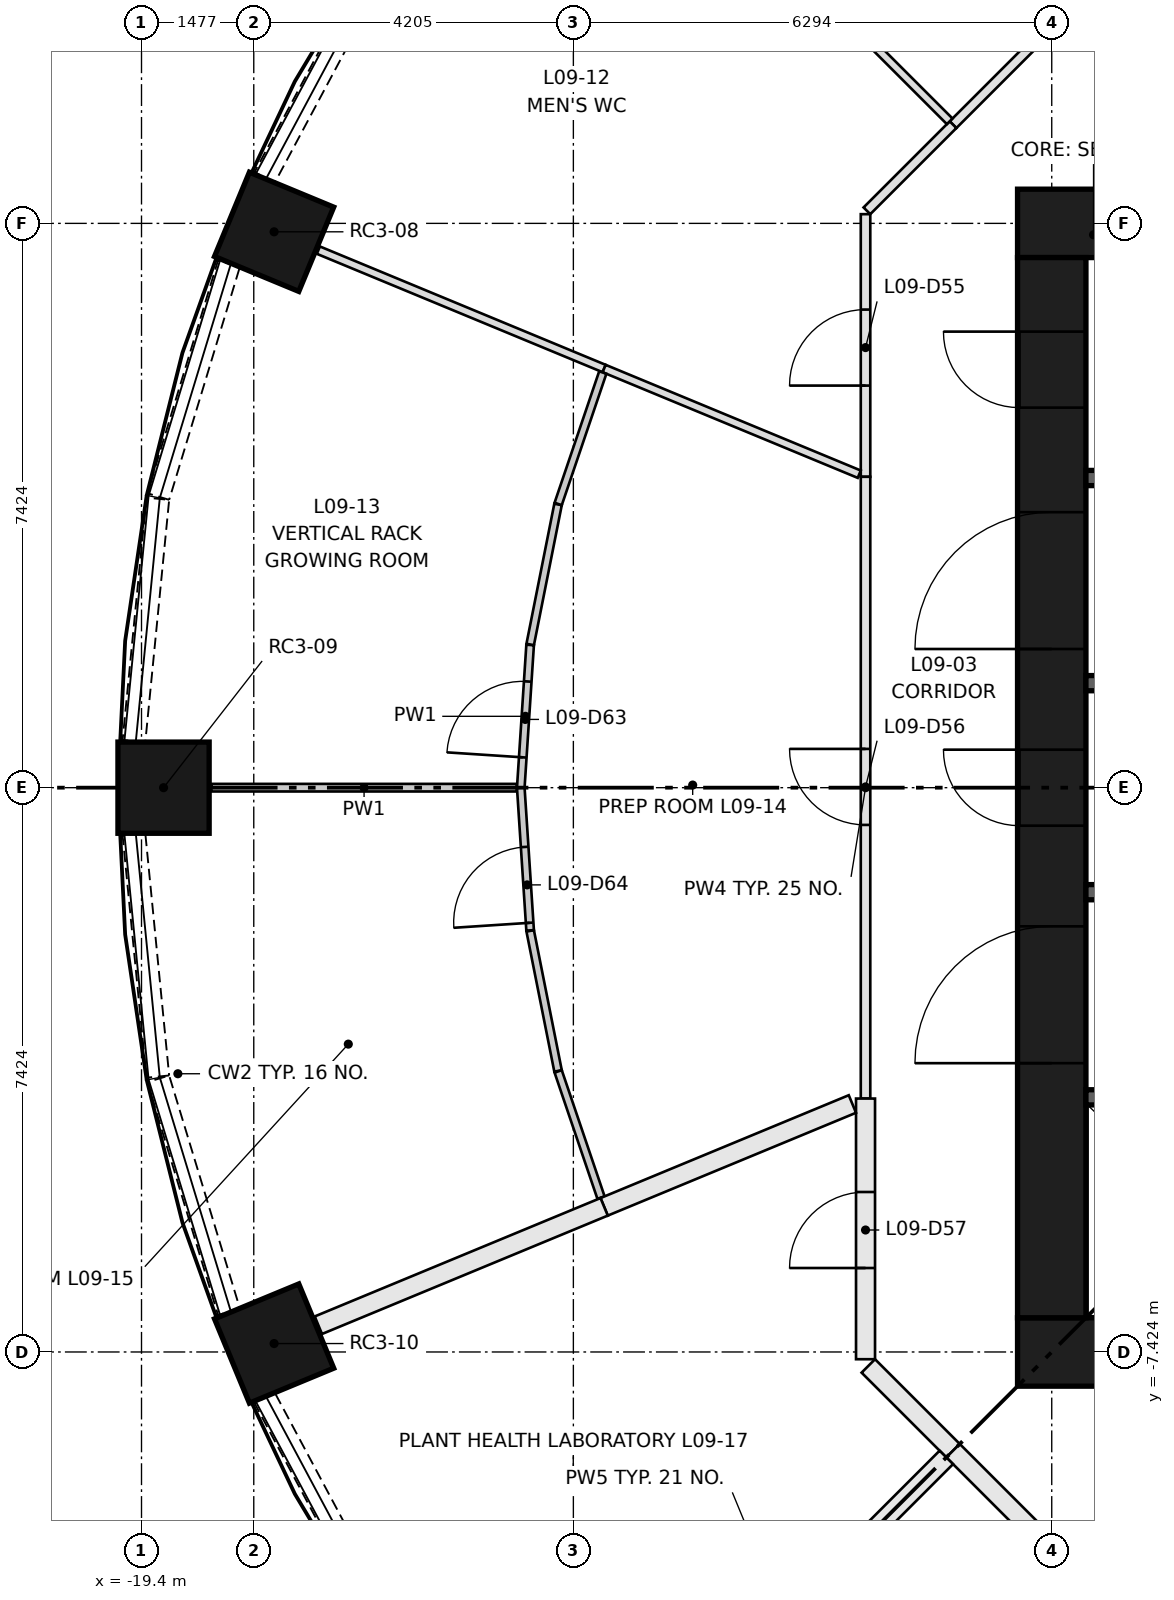
"""IFC4 building model, lengths in metres.
Left out: names, types, materials, properties, quantities, classifications, styles, units other than length and angle.
Written with IfcOpenShell. Run it as: python <this file> out.ifc"""

import sys

from ifc_helpers import new_model, si_unit, direction, frame, frame_2d, origin, origin_2d, place, context, subcontext, project, spatial, rectangle, extrude, element, fill, save


model = new_model("IFC4")
c1 = context("Model", 3, precision=1e-05, world=origin(), true_north=direction((0.0, 1.0)))
c2 = subcontext(c1, "Body", "Model", "MODEL_VIEW")
j1 = project(units=[si_unit("LENGTHUNIT", "METRE"), si_unit("PLANEANGLEUNIT", "RADIAN")], contexts=[c1])
p1 = place(None, origin())
s1 = spatial("IfcSite", under=j1, at=p1, CompositionType="ELEMENT")
p2 = place(p1, origin())
s2 = spatial("IfcBuilding", under=s1, at=p2, CompositionType="ELEMENT")
p3 = place(p2, frame((0.0, 0.0, 37.15)))
s3 = spatial("IfcBuildingStorey", under=s2, at=p3, CompositionType="ELEMENT", Elevation=37.15)
for number, where, z_axis, x_axis in (
    (1, (-17.655, 7.313, 0.0), (0.0, 0.0, 1.0), (-0.924, 0.383, 0.0)),
    (2, (-19.11, 0.0, 0.0), (0.0, 0.0, 1.0), (-1.0, 0.0, 0.0)),
    (3, (-17.655, -7.313, 0.0), (0.0, 0.0, 1.0), (-0.924, -0.383, 0.0)),
):
    element("IfcColumn", number, at=place(p3, frame(where, z_axis=z_axis, x_axis=x_axis)), inside=s3, PredefinedType="COLUMN", context=c2, shape_type="SweptSolid", body=[
        extrude(rectangle(XDim=1.2, YDim=1.2, at=origin_2d()), origin(), (0.0, 0.0, 1.0), 3.65),
    ])
for number, where, z_axis, x_axis in (
    (4, (-7.874, -7.424, 0.0), (0.0, 0.0, 1.0), (1.0, 0.0, 0.0)),
    (5, (-7.874, 7.424, 0.0), (0.0, 0.0, 1.0), (1.0, 0.0, 0.0)),
):
    element("IfcWall", number, at=place(p3, frame(where, z_axis=z_axis, x_axis=x_axis)), inside=s3, PredefinedType="SHEAR", context=c2, shape_type="SweptSolid", body=[
        extrude(rectangle(XDim=15.748, YDim=0.9, at=frame_2d((7.874, 0.0))), origin(), (0.0, 0.0, 1.0), 3.65),
    ])
p4 = place(p3, frame((-7.424, -6.974, 0.0), z_axis=(0.0, 0.0, 1.0), x_axis=(0.0, 1.0, 0.0)))
e6 = element("IfcWall", 6, at=p4, inside=s3, PredefinedType="SHEAR", context=c2, shape_type="SweptSolid", body=[
    extrude(rectangle(XDim=13.948, YDim=0.9, at=frame_2d((6.974, 0.0))), origin(), (0.0, 0.0, 1.0), 3.65),
])
p5 = place(p4, frame((6.474, 0.0, 0.0)))
e7 = element("IfcOpeningElement", 7, at=p5, cuts=e6, PredefinedType="OPENING", context=c2, shape_type="SweptSolid", body=[
    extrude(rectangle(XDim=1.0, YDim=2.1, at=frame_2d((0.5, 1.05))), frame((0.0, 0.46, 0.0), z_axis=(0.0, -1.0, 0.0), x_axis=(1.0, 0.0, 0.0)), (0.0, 0.0, 1.0), 0.92),
])
p6 = place(p4, frame((3.35, 0.0, 0.0)))
e8 = element("IfcOpeningElement", 8, at=p6, cuts=e6, PredefinedType="OPENING", context=c2, shape_type="SweptSolid", body=[
    extrude(rectangle(XDim=1.8, YDim=2.1, at=frame_2d((0.9, 1.05))), frame((0.0, 0.46, 0.0), z_axis=(0.0, -1.0, 0.0), x_axis=(1.0, 0.0, 0.0)), (0.0, 0.0, 1.0), 0.92),
])
p7 = place(p4, frame((8.799, 0.0, 0.0)))
e9 = element("IfcOpeningElement", 9, at=p7, cuts=e6, PredefinedType="OPENING", context=c2, shape_type="SweptSolid", body=[
    extrude(rectangle(XDim=1.8, YDim=2.1, at=frame_2d((0.9, 1.05))), frame((0.0, 0.46, 0.0), z_axis=(0.0, -1.0, 0.0), x_axis=(1.0, 0.0, 0.0)), (0.0, 0.0, 1.0), 0.92),
])
p8 = place(p4, frame((11.974, 0.0, 0.0)))
e10 = element("IfcOpeningElement", 10, at=p8, cuts=e6, PredefinedType="OPENING", context=c2, shape_type="SweptSolid", body=[
    extrude(rectangle(XDim=1.0, YDim=2.1, at=frame_2d((0.5, 1.05))), frame((0.0, 0.46, 0.0), z_axis=(0.0, -1.0, 0.0), x_axis=(1.0, 0.0, 0.0)), (0.0, 0.0, 1.0), 0.92),
])
p9 = place(p3, frame((-6.974, -4.074, 0.0), z_axis=(0.0, 0.0, 1.0), x_axis=(1.0, 0.0, 0.0)))
e11 = element("IfcWall", 11, at=p9, inside=s3, PredefinedType="SHEAR", context=c2, shape_type="SweptSolid", body=[
    extrude(rectangle(XDim=13.948, YDim=0.2, at=frame_2d((6.974, 0.0))), origin(), (0.0, 0.0, 1.0), 3.3),
])
p10 = place(p9, frame((0.918, 0.0, 0.0)))
e12 = element("IfcOpeningElement", 12, at=p10, cuts=e11, PredefinedType="OPENING", context=c2, shape_type="SweptSolid", body=[
    extrude(rectangle(XDim=1.1, YDim=2.1, at=frame_2d((0.55, 1.05))), frame((0.0, 0.11, 0.0), z_axis=(0.0, -1.0, 0.0), x_axis=(1.0, 0.0, 0.0)), (0.0, 0.0, 1.0), 0.22),
])
p11 = place(p9, frame((4.055, 0.0, 0.0)))
e13 = element("IfcOpeningElement", 13, at=p11, cuts=e11, PredefinedType="OPENING", context=c2, shape_type="SweptSolid", body=[
    extrude(rectangle(XDim=1.1, YDim=2.1, at=frame_2d((0.55, 1.05))), frame((0.0, 0.11, 0.0), z_axis=(0.0, -1.0, 0.0), x_axis=(1.0, 0.0, 0.0)), (0.0, 0.0, 1.0), 0.22),
])
p12 = place(p9, frame((6.658, 0.0, 0.0)))
e14 = element("IfcOpeningElement", 14, at=p12, cuts=e11, PredefinedType="OPENING", context=c2, shape_type="SweptSolid", body=[
    extrude(rectangle(XDim=1.0, YDim=2.1, at=frame_2d((0.5, 1.05))), frame((0.0, 0.11, 0.0), z_axis=(0.0, -1.0, 0.0), x_axis=(1.0, 0.0, 0.0)), (0.0, 0.0, 1.0), 0.22),
])
p13 = place(p9, frame((8.627, 0.0, 0.0)))
e15 = element("IfcOpeningElement", 15, at=p13, cuts=e11, PredefinedType="OPENING", context=c2, shape_type="SweptSolid", body=[
    extrude(rectangle(XDim=1.0, YDim=2.1, at=frame_2d((0.5, 1.05))), frame((0.0, 0.11, 0.0), z_axis=(0.0, -1.0, 0.0), x_axis=(1.0, 0.0, 0.0)), (0.0, 0.0, 1.0), 0.22),
])
p14 = place(p9, frame((10.595, 0.0, 0.0)))
e16 = element("IfcOpeningElement", 16, at=p14, cuts=e11, PredefinedType="OPENING", context=c2, shape_type="SweptSolid", body=[
    extrude(rectangle(XDim=1.0, YDim=2.1, at=frame_2d((0.5, 1.05))), frame((0.0, 0.11, 0.0), z_axis=(0.0, -1.0, 0.0), x_axis=(1.0, 0.0, 0.0)), (0.0, 0.0, 1.0), 0.22),
])
p15 = place(p9, frame((12.564, 0.0, 0.0)))
e17 = element("IfcOpeningElement", 17, at=p15, cuts=e11, PredefinedType="OPENING", context=c2, shape_type="SweptSolid", body=[
    extrude(rectangle(XDim=1.0, YDim=2.1, at=frame_2d((0.5, 1.05))), frame((0.0, 0.11, 0.0), z_axis=(0.0, -1.0, 0.0), x_axis=(1.0, 0.0, 0.0)), (0.0, 0.0, 1.0), 0.22),
])
p16 = place(p3, frame((-6.974, 4.074, 0.0), z_axis=(0.0, 0.0, 1.0), x_axis=(1.0, 0.0, 0.0)))
e18 = element("IfcWall", 18, at=p16, inside=s3, PredefinedType="SHEAR", context=c2, shape_type="SweptSolid", body=[
    extrude(rectangle(XDim=6.974, YDim=0.2, at=frame_2d((3.487, 0.0))), origin(), (0.0, 0.0, 1.0), 3.3),
])
for number, where, z_axis, x_axis in (
    (19, (-6.974, -1.375, 0.0), (0.0, 0.0, 1.0), (1.0, 0.0, 0.0)),
    (20, (-6.974, 1.375, 0.0), (0.0, 0.0, 1.0), (1.0, 0.0, 0.0)),
):
    element("IfcWall", number, at=place(p3, frame(where, z_axis=z_axis, x_axis=x_axis)), inside=s3, PredefinedType="SHEAR", context=c2, shape_type="SweptSolid", body=[
        extrude(rectangle(XDim=2.6, YDim=0.2, at=frame_2d((1.3, 0.0))), origin(), (0.0, 0.0, 1.0), 3.3),
    ])
p17 = place(p3, frame((-16.27, 10.854, 0.0), z_axis=(0.0, 0.0, 1.0), x_axis=(-0.471284265614, -0.881981372243, 0.0)))
e21 = element("IfcWall", 21, at=p17, inside=s3, PredefinedType="SOLIDWALL", context=c2, shape_type="SweptSolid", body=[
    extrude(rectangle(XDim=3.204, YDim=0.3, at=frame_2d((1.602, 0.0))), origin(), (0.0, 0.0, 1.0), 0.9),
])
p18 = place(p3, frame((-18.25, 6.895, 0.0), z_axis=(0.0, 0.0, 1.0), x_axis=(-0.290472877795, -0.956883225512, 0.0)))
e22 = element("IfcWall", 22, at=p18, inside=s3, PredefinedType="SOLIDWALL", context=c2, shape_type="SweptSolid", body=[
    extrude(rectangle(XDim=3.202, YDim=0.3, at=frame_2d((1.601, 0.0))), origin(), (0.0, 0.0, 1.0), 0.9),
])
for number, where, z_axis, x_axis in (
    (23, (-19.186, 3.801, 0.0), (0.0, 0.0, 1.0), (-0.098, -0.995, 0.0)),
    (24, (-19.5, -0.613, 0.0), (0.0, 0.0, 1.0), (0.098, -0.995, 0.0)),
):
    element("IfcWall", number, at=place(p3, frame(where, z_axis=z_axis, x_axis=x_axis)), inside=s3, PredefinedType="SOLIDWALL", context=c2, shape_type="SweptSolid", body=[
        extrude(rectangle(XDim=3.204, YDim=0.3, at=frame_2d((1.602, 0.0))), origin(), (0.0, 0.0, 1.0), 0.9),
    ])
p19 = place(p3, frame((-19.18, -3.83, 0.0), z_axis=(0.0, 0.0, 1.0), x_axis=(0.290472877795, -0.956883225512, 0.0)))
e25 = element("IfcWall", 25, at=p19, inside=s3, PredefinedType="SOLIDWALL", context=c2, shape_type="SweptSolid", body=[
    extrude(rectangle(XDim=3.202, YDim=0.3, at=frame_2d((1.601, 0.0))), origin(), (0.0, 0.0, 1.0), 0.9),
])
p20 = place(p3, frame((-17.78, -8.028, 0.0), z_axis=(0.0, 0.0, 1.0), x_axis=(0.471284265614, -0.881981372243, 0.0)))
e26 = element("IfcWall", 26, at=p20, inside=s3, PredefinedType="SOLIDWALL", context=c2, shape_type="SweptSolid", body=[
    extrude(rectangle(XDim=3.204, YDim=0.3, at=frame_2d((1.602, 0.0))), origin(), (0.0, 0.0, 1.0), 0.9),
])
p21 = place(p3, frame((-8.722, 8.722, 0.0), z_axis=(0.0, 0.0, 1.0), x_axis=(0.707030604857, 0.70718294931, 0.0)))
e27 = element("IfcWall", 27, at=p21, inside=s3, PredefinedType="PARTITIONING", context=c2, shape_type="SweptSolid", body=[
    extrude(rectangle(XDim=1.603, YDim=0.125, at=frame_2d((0.801, 0.0))), origin(), (0.0, 0.0, 1.0), 3.3),
])
p22 = place(p3, frame((-9.874, 4.09, 0.0), z_axis=(0.0, 0.0, 1.0), x_axis=(0.0, 1.0, 0.0)))
e28 = element("IfcWall", 28, at=p22, inside=s3, PredefinedType="PARTITIONING", context=c2, shape_type="SweptSolid", body=[
    extrude(rectangle(XDim=3.455, YDim=0.125, at=frame_2d((1.728, 0.0))), origin(), (0.0, 0.0, 1.0), 3.3),
])
p23 = place(p22, frame((1.2, 0.0, 0.0)))
e29 = element("IfcOpeningElement", 29, at=p23, cuts=e28, PredefinedType="OPENING", context=c2, shape_type="SweptSolid", body=[
    extrude(rectangle(XDim=1.0, YDim=2.1, at=frame_2d((0.5, 1.05))), frame((0.0, 0.073, 0.0), z_axis=(0.0, -1.0, 0.0), x_axis=(1.0, 0.0, 0.0)), (0.0, 0.0, 1.0), 0.145),
])
p24 = place(p3, frame((-9.856, 7.589, 0.0), z_axis=(0.0, 0.0, 1.0), x_axis=(0.70718294931, 0.707030604857, 0.0)))
e30 = element("IfcWall", 30, at=p24, inside=s3, PredefinedType="PARTITIONING", context=c2, shape_type="SweptSolid", body=[
    extrude(rectangle(XDim=1.603, YDim=0.125, at=frame_2d((0.801, 0.0))), origin(), (0.0, 0.0, 1.0), 3.3),
])
p25 = place(p3, frame((-9.874, -4.09, 0.0), z_axis=(0.0, 0.0, 1.0), x_axis=(0.0, 1.0, 0.0)))
e31 = element("IfcWall", 31, at=p25, inside=s3, PredefinedType="PARTITIONING", context=c2, shape_type="SweptSolid", body=[
    extrude(rectangle(XDim=8.18, YDim=0.125, at=frame_2d((4.09, 0.0))), origin(), (0.0, 0.0, 1.0), 3.3),
])
p26 = place(p25, frame((3.6, 0.0, 0.0)))
e32 = element("IfcOpeningElement", 32, at=p26, cuts=e31, PredefinedType="OPENING", context=c2, shape_type="SweptSolid", body=[
    extrude(rectangle(XDim=1.0, YDim=2.1, at=frame_2d((0.5, 1.05))), frame((0.0, 0.073, 0.0), z_axis=(0.0, -1.0, 0.0), x_axis=(1.0, 0.0, 0.0)), (0.0, 0.0, 1.0), 0.145),
])
p27 = place(p3, frame((-9.874, -7.519, 0.0), z_axis=(0.0, 0.0, 1.0), x_axis=(0.0, 1.0, 0.0)))
e33 = element("IfcWall", 33, at=p27, inside=s3, PredefinedType="PARTITIONING", context=c2, shape_type="SweptSolid", body=[
    extrude(rectangle(XDim=3.429, YDim=0.25, at=frame_2d((1.715, 0.0))), origin(), (0.0, 0.0, 1.0), 3.3),
])
p28 = place(p27, frame((1.2, 0.0, 0.0)))
e34 = element("IfcOpeningElement", 34, at=p28, cuts=e33, PredefinedType="OPENING", context=c2, shape_type="SweptSolid", body=[
    extrude(rectangle(XDim=1.0, YDim=2.1, at=frame_2d((0.5, 1.05))), frame((0.0, 0.135, 0.0), z_axis=(0.0, -1.0, 0.0), x_axis=(1.0, 0.0, 0.0)), (0.0, 0.0, 1.0), 0.27),
])
for number, where, z_axis, x_axis in (
    (35, (-8.722, -8.722, 0.0), (0.0, 0.0, 1.0), (-0.707, 0.707, 0.0)),
    (36, (-7.608, -9.837, 0.0), (0.0, 0.0, 1.0), (-0.707, 0.707, 0.0)),
):
    element("IfcWall", number, at=place(p3, frame(where, z_axis=z_axis, x_axis=x_axis)), inside=s3, PredefinedType="PARTITIONING", context=c2, shape_type="SweptSolid", body=[
        extrude(rectangle(XDim=1.577, YDim=0.25, at=frame_2d((0.788, 0.0))), origin(), (0.0, 0.0, 1.0), 3.3),
    ])
p29 = place(p3, frame((-8.767, 8.767, 0.0), z_axis=(0.0, 0.0, 1.0), x_axis=(-0.707106781187, 0.707106781187, 0.0)))
e37 = element("IfcWall", 37, at=p29, inside=s3, PredefinedType="PARTITIONING", context=c2, shape_type="SweptSolid", body=[
    extrude(rectangle(XDim=6.082, YDim=0.105, at=frame_2d((3.041, 0.0))), origin(), (0.0, 0.0, 1.0), 3.3),
])
p30 = place(p3, frame((-13.313, 5.514, 0.0), z_axis=(0.0, 0.0, 1.0), x_axis=(-0.923873536763, 0.382697907061, 0.0)))
e38 = element("IfcWall", 38, at=p30, inside=s3, PredefinedType="PARTITIONING", context=c2, shape_type="SweptSolid", body=[
    extrude(rectangle(XDim=4.07, YDim=0.105, at=frame_2d((2.035, 0.0))), origin(), (0.0, 0.0, 1.0), 3.3),
])
p31 = place(p3, frame((-9.957, 4.124, 0.0), z_axis=(0.0, 0.0, 1.0), x_axis=(-0.923870220065, 0.382705913825, 0.0)))
e39 = element("IfcWall", 39, at=p31, inside=s3, PredefinedType="PARTITIONING", context=c2, shape_type="SweptSolid", body=[
    extrude(rectangle(XDim=3.633, YDim=0.105, at=frame_2d((1.816, 0.0))), origin(), (0.0, 0.0, 1.0), 3.3),
])
p32 = place(p3, frame((-14.41, 0.0, 0.0), z_axis=(0.0, 0.0, 1.0), x_axis=(0.065390885675, 0.997859725648, 0.0)))
e40 = element("IfcWall", 40, at=p32, inside=s3, PredefinedType="PARTITIONING", context=c2, shape_type="SweptSolid", body=[
    extrude(rectangle(XDim=1.882, YDim=0.1, at=frame_2d((0.941, 0.0))), origin(), (0.0, 0.0, 1.0), 3.3),
])
p33 = place(p32, frame((0.4, 0.0, 0.0)))
e41 = element("IfcOpeningElement", 41, at=p33, cuts=e40, PredefinedType="OPENING", context=c2, shape_type="SweptSolid", body=[
    extrude(rectangle(XDim=1.0, YDim=2.1, at=frame_2d((0.5, 1.05))), frame((0.0, 0.06, 0.0), z_axis=(0.0, -1.0, 0.0), x_axis=(1.0, 0.0, 0.0)), (0.0, 0.0, 1.0), 0.12),
])
p34 = place(p3, frame((-13.92, 3.726, 0.0), z_axis=(0.0, 0.0, 1.0), x_axis=(-0.195091231684, -0.980785099459, 0.0)))
e42 = element("IfcWall", 42, at=p34, inside=s3, PredefinedType="PARTITIONING", context=c2, shape_type="SweptSolid", body=[
    extrude(rectangle(XDim=1.878, YDim=0.1, at=frame_2d((0.939, 0.0))), origin(), (0.0, 0.0, 1.0), 3.3),
])
p35 = place(p3, frame((-13.331, 5.461, 0.0), z_axis=(0.0, 0.0, 1.0), x_axis=(-0.321478362794, -0.946916924685, 0.0)))
e43 = element("IfcWall", 43, at=p35, inside=s3, PredefinedType="PARTITIONING", context=c2, shape_type="SweptSolid", body=[
    extrude(rectangle(XDim=1.826, YDim=0.1, at=frame_2d((0.913, 0.0))), origin(), (0.0, 0.0, 1.0), 3.3),
])
p36 = place(p3, frame((-14.463, 0.0, 0.0), z_axis=(0.0, 0.0, 1.0), x_axis=(-1.0, 0.0, 0.0)))
e44 = element("IfcWall", 44, at=p36, inside=s3, PredefinedType="PARTITIONING", context=c2, shape_type="SweptSolid", body=[
    extrude(rectangle(XDim=4.017, YDim=0.1, at=frame_2d((2.008, 0.0))), origin(), (0.0, 0.0, 1.0), 3.3),
])
p37 = place(p3, frame((-14.287, -1.878, 0.0), z_axis=(0.0, 0.0, 1.0), x_axis=(-0.065390885675, 0.997859725648, 0.0)))
e45 = element("IfcWall", 45, at=p37, inside=s3, PredefinedType="PARTITIONING", context=c2, shape_type="SweptSolid", body=[
    extrude(rectangle(XDim=1.882, YDim=0.1, at=frame_2d((0.941, 0.0))), origin(), (0.0, 0.0, 1.0), 3.3),
])
p38 = place(p37, frame((0.1, 0.0, 0.0)))
e46 = element("IfcOpeningElement", 46, at=p38, cuts=e45, PredefinedType="OPENING", context=c2, shape_type="SweptSolid", body=[
    extrude(rectangle(XDim=1.0, YDim=2.1, at=frame_2d((0.5, 1.05))), frame((0.0, 0.06, 0.0), z_axis=(0.0, -1.0, 0.0), x_axis=(1.0, 0.0, 0.0)), (0.0, 0.0, 1.0), 0.12),
])
p39 = place(p3, frame((-13.92, -3.726, 0.0), z_axis=(0.0, 0.0, 1.0), x_axis=(-0.195091231684, 0.980785099459, 0.0)))
e47 = element("IfcWall", 47, at=p39, inside=s3, PredefinedType="PARTITIONING", context=c2, shape_type="SweptSolid", body=[
    extrude(rectangle(XDim=1.878, YDim=0.1, at=frame_2d((0.939, 0.0))), origin(), (0.0, 0.0, 1.0), 3.3),
])
p40 = place(p3, frame((-13.354, -5.393, 0.0), z_axis=(0.0, 0.0, 1.0), x_axis=(-0.321445771201, 0.946927988908, 0.0)))
e48 = element("IfcWall", 48, at=p40, inside=s3, PredefinedType="PARTITIONING", context=c2, shape_type="SweptSolid", body=[
    extrude(rectangle(XDim=1.753, YDim=0.1, at=frame_2d((0.876, 0.0))), origin(), (0.0, 0.0, 1.0), 3.3),
])
p41 = place(p3, frame((-10.047, -4.162, 0.0), z_axis=(0.0, 0.0, 1.0), x_axis=(-0.92388805455, -0.382662857696, 0.0)))
e49 = element("IfcWall", 49, at=p41, inside=s3, PredefinedType="PARTITIONING", context=c2, shape_type="SweptSolid", body=[
    extrude(rectangle(XDim=3.535, YDim=0.25, at=frame_2d((1.768, 0.0))), origin(), (0.0, 0.0, 1.0), 3.3),
])
p42 = place(p3, frame((-13.313, -5.514, 0.0), z_axis=(0.0, 0.0, 1.0), x_axis=(-0.923873536763, -0.382697907061, 0.0)))
e50 = element("IfcWall", 50, at=p42, inside=s3, PredefinedType="PARTITIONING", context=c2, shape_type="SweptSolid", body=[
    extrude(rectangle(XDim=4.07, YDim=0.25, at=frame_2d((2.035, 0.0))), origin(), (0.0, 0.0, 1.0), 3.3),
])
p43 = place(p3, frame((-13.067, -13.067, 0.0), z_axis=(0.0, 0.0, 1.0), x_axis=(0.707106781187, 0.707106781187, 0.0)))
e51 = element("IfcWall", 51, at=p43, inside=s3, PredefinedType="PARTITIONING", context=c2, shape_type="SweptSolid", body=[
    extrude(rectangle(XDim=6.02, YDim=0.25, at=frame_2d((3.01, 0.0))), origin(), (0.0, 0.0, 1.0), 3.3),
])
p44 = place(p5, origin())
e52 = element("IfcDoor", 52, at=p44, inside=s3, OperationType="SINGLE_SWING_RIGHT", PredefinedType="DOOR", context=c2, shape_type="SweptSolid", body=[
    extrude(rectangle(XDim=1.0, YDim=2.1, at=frame_2d((0.5, 1.05))), frame((0.0, 0.45, 0.0), z_axis=(0.0, -1.0, 0.0), x_axis=(1.0, 0.0, 0.0)), (0.0, 0.0, 1.0), 0.05),
])
fill(e7, e52)
p45 = place(p6, origin())
e53 = element("IfcDoor", 53, at=p45, inside=s3, OperationType="DOUBLE_DOOR_SINGLE_SWING", PredefinedType="DOOR", context=c2, shape_type="SweptSolid", body=[
    extrude(rectangle(XDim=1.8, YDim=2.1, at=frame_2d((0.9, 1.05))), frame((0.0, 0.025, 0.0), z_axis=(0.0, -1.0, 0.0), x_axis=(1.0, 0.0, 0.0)), (0.0, 0.0, 1.0), 0.05),
])
fill(e8, e53)
p46 = place(p7, origin())
e54 = element("IfcDoor", 54, at=p46, inside=s3, OperationType="DOUBLE_DOOR_SINGLE_SWING", PredefinedType="DOOR", context=c2, shape_type="SweptSolid", body=[
    extrude(rectangle(XDim=1.8, YDim=2.1, at=frame_2d((0.9, 1.05))), frame((0.0, 0.025, 0.0), z_axis=(0.0, -1.0, 0.0), x_axis=(1.0, 0.0, 0.0)), (0.0, 0.0, 1.0), 0.05),
])
fill(e9, e54)
p47 = place(p8, origin())
e55 = element("IfcDoor", 55, at=p47, inside=s3, OperationType="SINGLE_SWING_RIGHT", PredefinedType="DOOR", context=c2, shape_type="SweptSolid", body=[
    extrude(rectangle(XDim=1.0, YDim=2.1, at=frame_2d((0.5, 1.05))), frame((0.0, 0.45, 0.0), z_axis=(0.0, -1.0, 0.0), x_axis=(1.0, 0.0, 0.0)), (0.0, 0.0, 1.0), 0.05),
])
fill(e10, e55)
p48 = place(p23, origin())
e56 = element("IfcDoor", 56, at=p48, inside=s3, OperationType="SINGLE_SWING_LEFT", PredefinedType="DOOR", context=c2, shape_type="SweptSolid", body=[
    extrude(rectangle(XDim=1.0, YDim=2.1, at=frame_2d((0.5, 1.05))), frame((0.0, 0.025, 0.0), z_axis=(0.0, -1.0, 0.0), x_axis=(1.0, 0.0, 0.0)), (0.0, 0.0, 1.0), 0.05),
])
fill(e29, e56)
p49 = place(p26, origin())
e57 = element("IfcDoor", 57, at=p49, inside=s3, OperationType="SINGLE_SWING_RIGHT", PredefinedType="DOOR", context=c2, shape_type="SweptSolid", body=[
    extrude(rectangle(XDim=1.0, YDim=2.1, at=frame_2d((0.5, 1.05))), frame((0.0, 0.025, 0.0), z_axis=(0.0, -1.0, 0.0), x_axis=(1.0, 0.0, 0.0)), (0.0, 0.0, 1.0), 0.05),
])
fill(e32, e57)
p50 = place(p28, origin())
e58 = element("IfcDoor", 58, at=p50, inside=s3, OperationType="SINGLE_SWING_LEFT", PredefinedType="DOOR", context=c2, shape_type="SweptSolid", body=[
    extrude(rectangle(XDim=1.0, YDim=2.1, at=frame_2d((0.5, 1.05))), frame((0.0, 0.025, 0.0), z_axis=(0.0, -1.0, 0.0), x_axis=(1.0, 0.0, 0.0)), (0.0, 0.0, 1.0), 0.05),
])
fill(e34, e58)
p51 = place(p33, origin())
e59 = element("IfcDoor", 59, at=p51, inside=s3, OperationType="SINGLE_SWING_LEFT", PredefinedType="DOOR", context=c2, shape_type="SweptSolid", body=[
    extrude(rectangle(XDim=1.0, YDim=2.1, at=frame_2d((0.5, 1.05))), frame((0.0, 0.025, 0.0), z_axis=(0.0, -1.0, 0.0), x_axis=(1.0, 0.0, 0.0)), (0.0, 0.0, 1.0), 0.05),
])
fill(e41, e59)
p52 = place(p38, origin())
e60 = element("IfcDoor", 60, at=p52, inside=s3, OperationType="SINGLE_SWING_LEFT", PredefinedType="DOOR", context=c2, shape_type="SweptSolid", body=[
    extrude(rectangle(XDim=1.0, YDim=2.1, at=frame_2d((0.5, 1.05))), frame((0.0, 0.025, 0.0), z_axis=(0.0, -1.0, 0.0), x_axis=(1.0, 0.0, 0.0)), (0.0, 0.0, 1.0), 0.05),
])
fill(e46, e60)
save(model, sys.argv[1])
